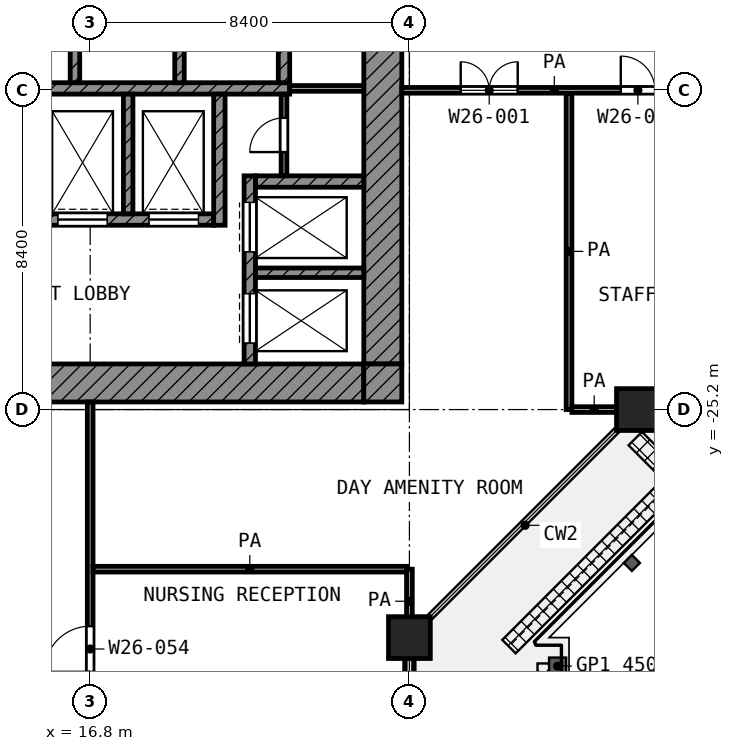
"""IFC4 building model, lengths in metres.
Left out: names, types, materials, properties, quantities, classifications, styles, units other than length and angle.
Written with IfcOpenShell. Run it as: python <this file> out.ifc"""

import sys

from ifc_helpers import new_model, si_unit, direction, frame, frame_2d, origin, origin_2d, place, context, subcontext, project, spatial, rectangle, extrude, element, fill, save


model = new_model("IFC4")
c1 = context("Model", 3, precision=1e-05, world=origin(), true_north=direction((0.0, 1.0)))
c2 = subcontext(c1, "Body", "Model", "MODEL_VIEW")
j1 = project(units=[si_unit("LENGTHUNIT", "METRE"), si_unit("PLANEANGLEUNIT", "RADIAN")], contexts=[c1])
p1 = place(None, origin())
s1 = spatial("IfcSite", under=j1, at=p1, CompositionType="ELEMENT")
p2 = place(p1, origin())
s2 = spatial("IfcBuilding", under=s1, at=p2, CompositionType="ELEMENT")
p3 = place(p2, frame((0.0, 0.0, 136.6)))
s3 = spatial("IfcBuildingStorey", under=s2, at=p3, CompositionType="ELEMENT", Elevation=136.6)
for number, where, z_axis, x_axis in (
    (1, (31.2, -25.2, 0.0), (0.0, 0.0, 1.0), (1.0, 0.0, 0.0)),
    (2, (25.2, -31.2, 0.0), (0.0, 0.0, 1.0), (1.0, 0.0, 0.0)),
):
    element("IfcColumn", number, at=place(p3, frame(where, z_axis=z_axis, x_axis=x_axis)), inside=s3, PredefinedType="COLUMN", context=c2, shape_type="SweptSolid", body=[
        extrude(rectangle(XDim=1.1, YDim=1.1, at=origin_2d()), origin(), (0.0, 0.0, 1.0), 4.2),
    ])
p4 = place(p3, frame((25.2, -34.992, 0.0), z_axis=(0.0, 0.0, 1.0), x_axis=(0.0, 1.0, 0.0)))
e3 = element("IfcWall", 3, at=p4, inside=s3, PredefinedType="SOLIDWALL", context=c2, shape_type="SweptSolid", body=[
    extrude(rectangle(XDim=3.242, YDim=0.25, at=frame_2d((1.621, 0.0))), origin(), (0.0, 0.0, 1.0), 3.48),
])
p5 = place(p4, frame((1.621, 0.0, 0.0)))
e4 = element("IfcOpeningElement", 4, at=p5, cuts=e3, PredefinedType="OPENING", context=c2, shape_type="SweptSolid", body=[
    extrude(rectangle(XDim=1.0, YDim=2.1, at=frame_2d((0.5, 1.05))), frame((0.0, 0.135, 0.0), z_axis=(0.0, -1.0, 0.0), x_axis=(1.0, 0.0, 0.0)), (0.0, 0.0, 1.0), 0.27),
])
p6 = place(p3, frame((24.5, -24.0, 0.0), z_axis=(0.0, 0.0, 1.0), x_axis=(0.0, 1.0, 0.0)))
e5 = element("IfcWall", 5, at=p6, inside=s3, PredefinedType="SHEAR", context=c2, shape_type="SweptSolid", body=[
    extrude(rectangle(XDim=18.6, YDim=1.0, at=frame_2d((9.3, 0.0))), origin(), (0.0, 0.0, 1.0), 3.6),
])
p7 = place(p6, frame((10.5, 0.0, 0.0)))
e6 = element("IfcOpeningElement", 6, at=p7, cuts=e5, PredefinedType="OPENING", context=c2, shape_type="SweptSolid", body=[
    extrude(rectangle(XDim=1.8, YDim=2.1, at=frame_2d((0.9, 1.05))), frame((0.0, 0.51, 0.0), z_axis=(0.0, -1.0, 0.0), x_axis=(1.0, 0.0, 0.0)), (0.0, 0.0, 1.0), 1.02),
])
p8 = place(p3, frame((5.4, -24.5, 0.0), z_axis=(0.0, 0.0, 1.0), x_axis=(1.0, 0.0, 0.0)))
e7 = element("IfcWall", 7, at=p8, inside=s3, PredefinedType="SHEAR", context=c2, shape_type="SweptSolid", body=[
    extrude(rectangle(XDim=18.6, YDim=1.0, at=frame_2d((9.3, 0.0))), origin(), (0.0, 0.0, 1.0), 3.6),
])
p9 = place(p8, frame((6.3, 0.0, 0.0)))
e8 = element("IfcOpeningElement", 8, at=p9, cuts=e7, PredefinedType="OPENING", context=c2, shape_type="SweptSolid", body=[
    extrude(rectangle(XDim=1.8, YDim=2.1, at=frame_2d((0.9, 1.05))), frame((0.0, 0.51, 0.0), z_axis=(0.0, -1.0, 0.0), x_axis=(1.0, 0.0, 0.0)), (0.0, 0.0, 1.0), 1.02),
])
p10 = place(p3, frame((24.5, -25.0, 0.0), z_axis=(0.0, 0.0, 1.0), x_axis=(0.0, 1.0, 0.0)))
e9 = element("IfcWall", 9, at=p10, inside=s3, PredefinedType="SHEAR", context=c2, shape_type="SweptSolid", body=[
    extrude(rectangle(XDim=1.0, YDim=1.0, at=frame_2d((0.5, 0.0))), origin(), (0.0, 0.0, 1.0), 3.6),
])
p11 = place(p3, frame((5.4, -16.75, 0.0), z_axis=(0.0, 0.0, 1.0), x_axis=(1.0, 0.0, 0.0)))
e10 = element("IfcWall", 10, at=p11, inside=s3, PredefinedType="SHEAR", context=c2, shape_type="SweptSolid", body=[
    extrude(rectangle(XDim=16.65, YDim=0.3, at=frame_2d((8.325, 0.0))), origin(), (0.0, 0.0, 1.0), 3.6),
])
p12 = place(p3, frame((5.4, -20.2, 0.0), z_axis=(0.0, 0.0, 1.0), x_axis=(1.0, 0.0, 0.0)))
e11 = element("IfcWall", 11, at=p12, inside=s3, PredefinedType="SHEAR", context=c2, shape_type="SweptSolid", body=[
    extrude(rectangle(XDim=14.65, YDim=0.3, at=frame_2d((7.325, 0.0))), origin(), (0.0, 0.0, 1.0), 3.6),
])
p13 = place(p12, frame((10.55, 0.0, 0.0)))
e12 = element("IfcOpeningElement", 12, at=p13, cuts=e11, PredefinedType="OPENING", context=c2, shape_type="SweptSolid", body=[
    extrude(rectangle(XDim=1.3, YDim=2.1, at=frame_2d((0.65, 1.05))), frame((0.0, 0.16, 0.0), z_axis=(0.0, -1.0, 0.0), x_axis=(1.0, 0.0, 0.0)), (0.0, 0.0, 1.0), 0.32),
])
p14 = place(p12, frame((12.95, 0.0, 0.0)))
e13 = element("IfcOpeningElement", 13, at=p14, cuts=e11, PredefinedType="OPENING", context=c2, shape_type="SweptSolid", body=[
    extrude(rectangle(XDim=1.3, YDim=2.1, at=frame_2d((0.65, 1.05))), frame((0.0, 0.16, 0.0), z_axis=(0.0, -1.0, 0.0), x_axis=(1.0, 0.0, 0.0)), (0.0, 0.0, 1.0), 0.32),
])
p15 = place(p12, frame((0.55, 0.0, 0.0)))
e14 = element("IfcOpeningElement", 14, at=p15, cuts=e11, PredefinedType="OPENING", context=c2, shape_type="SweptSolid", body=[
    extrude(rectangle(XDim=1.3, YDim=2.1, at=frame_2d((0.65, 1.05))), frame((0.0, 0.16, 0.0), z_axis=(0.0, -1.0, 0.0), x_axis=(1.0, 0.0, 0.0)), (0.0, 0.0, 1.0), 0.32),
])
p16 = place(p12, frame((2.95, 0.0, 0.0)))
e15 = element("IfcOpeningElement", 15, at=p16, cuts=e11, PredefinedType="OPENING", context=c2, shape_type="SweptSolid", body=[
    extrude(rectangle(XDim=1.3, YDim=2.1, at=frame_2d((0.65, 1.05))), frame((0.0, 0.16, 0.0), z_axis=(0.0, -1.0, 0.0), x_axis=(1.0, 0.0, 0.0)), (0.0, 0.0, 1.0), 0.32),
])
p17 = place(p12, frame((6.55, 0.0, 0.0)))
e16 = element("IfcOpeningElement", 16, at=p17, cuts=e11, PredefinedType="OPENING", context=c2, shape_type="SweptSolid", body=[
    extrude(rectangle(XDim=0.9, YDim=2.1, at=frame_2d((0.45, 1.05))), frame((0.0, 0.16, 0.0), z_axis=(0.0, -1.0, 0.0), x_axis=(1.0, 0.0, 0.0)), (0.0, 0.0, 1.0), 0.32),
])
p18 = place(p12, frame((8.95, 0.0, 0.0)))
e17 = element("IfcOpeningElement", 17, at=p18, cuts=e11, PredefinedType="OPENING", context=c2, shape_type="SweptSolid", body=[
    extrude(rectangle(XDim=0.9, YDim=2.1, at=frame_2d((0.45, 1.05))), frame((0.0, 0.16, 0.0), z_axis=(0.0, -1.0, 0.0), x_axis=(1.0, 0.0, 0.0)), (0.0, 0.0, 1.0), 0.32),
])
p19 = place(p3, frame((20.2, -20.35, 0.0), z_axis=(0.0, 0.0, 1.0), x_axis=(0.0, 1.0, 0.0)))
e18 = element("IfcWall", 18, at=p19, inside=s3, PredefinedType="SHEAR", context=c2, shape_type="SweptSolid", body=[
    extrude(rectangle(XDim=3.45, YDim=0.3, at=frame_2d((1.725, 0.0))), origin(), (0.0, 0.0, 1.0), 3.6),
])
p20 = place(p3, frame((21.9, -16.6, 0.0), z_axis=(0.0, 0.0, 1.0), x_axis=(0.0, 1.0, 0.0)))
e19 = element("IfcWall", 19, at=p20, inside=s3, PredefinedType="SHEAR", context=c2, shape_type="SweptSolid", body=[
    extrude(rectangle(XDim=2.35, YDim=0.3, at=frame_2d((1.175, 0.0))), origin(), (0.0, 0.0, 1.0), 3.6),
])
p21 = place(p3, frame((21.15, -19.2, 0.0), z_axis=(0.0, 0.0, 1.0), x_axis=(1.0, 0.0, 0.0)))
e20 = element("IfcWall", 20, at=p21, inside=s3, PredefinedType="SHEAR", context=c2, shape_type="SweptSolid", body=[
    extrude(rectangle(XDim=2.85, YDim=0.3, at=frame_2d((1.425, 0.0))), origin(), (0.0, 0.0, 1.0), 3.6),
])
p22 = place(p3, frame((21.0, -24.0, 0.0), z_axis=(0.0, 0.0, 1.0), x_axis=(0.0, 1.0, 0.0)))
e21 = element("IfcWall", 21, at=p22, inside=s3, PredefinedType="SHEAR", context=c2, shape_type="SweptSolid", body=[
    extrude(rectangle(XDim=4.95, YDim=0.3, at=frame_2d((2.475, 0.0))), origin(), (0.0, 0.0, 1.0), 3.6),
])
p23 = place(p22, frame((2.95, 0.0, 0.0)))
e22 = element("IfcOpeningElement", 22, at=p23, cuts=e21, PredefinedType="OPENING", context=c2, shape_type="SweptSolid", body=[
    extrude(rectangle(XDim=1.3, YDim=2.1, at=frame_2d((0.65, 1.05))), frame((0.0, 0.16, 0.0), z_axis=(0.0, -1.0, 0.0), x_axis=(1.0, 0.0, 0.0)), (0.0, 0.0, 1.0), 0.32),
])
p24 = place(p22, frame((0.55, 0.0, 0.0)))
e23 = element("IfcOpeningElement", 23, at=p24, cuts=e21, PredefinedType="OPENING", context=c2, shape_type="SweptSolid", body=[
    extrude(rectangle(XDim=1.3, YDim=2.1, at=frame_2d((0.65, 1.05))), frame((0.0, 0.16, 0.0), z_axis=(0.0, -1.0, 0.0), x_axis=(1.0, 0.0, 0.0)), (0.0, 0.0, 1.0), 0.32),
])
p25 = place(p3, frame((21.15, -21.6, 0.0), z_axis=(0.0, 0.0, 1.0), x_axis=(1.0, 0.0, 0.0)))
e24 = element("IfcWall", 24, at=p25, inside=s3, PredefinedType="SHEAR", context=c2, shape_type="SweptSolid", body=[
    extrude(rectangle(XDim=2.85, YDim=0.25, at=frame_2d((1.425, 0.0))), origin(), (0.0, 0.0, 1.0), 3.6),
])
p26 = place(p3, frame((17.8, -20.05, 0.0), z_axis=(0.0, 0.0, 1.0), x_axis=(0.0, 1.0, 0.0)))
e25 = element("IfcWall", 25, at=p26, inside=s3, PredefinedType="SHEAR", context=c2, shape_type="SweptSolid", body=[
    extrude(rectangle(XDim=3.15, YDim=0.25, at=frame_2d((1.575, 0.0))), origin(), (0.0, 0.0, 1.0), 3.6),
])
for number, where, z_axis, x_axis in (
    (26, (16.4, -16.6, 0.0), (0.0, 0.0, 1.0), (0.0, 1.0, 0.0)),
    (27, (19.15, -16.6, 0.0), (0.0, 0.0, 1.0), (0.0, 1.0, 0.0)),
):
    element("IfcWall", number, at=place(p3, frame(where, z_axis=z_axis, x_axis=x_axis)), inside=s3, PredefinedType="SHEAR", context=c2, shape_type="SweptSolid", body=[
        extrude(rectangle(XDim=2.35, YDim=0.25, at=frame_2d((1.175, 0.0))), origin(), (0.0, 0.0, 1.0), 3.6),
    ])
p27 = place(p3, frame((21.9, -19.05, 0.0), z_axis=(0.0, 0.0, 1.0), x_axis=(0.0, 1.0, 0.0)))
e28 = element("IfcWall", 28, at=p27, inside=s3, PredefinedType="PARTITIONING", context=c2, shape_type="SweptSolid", body=[
    extrude(rectangle(XDim=2.15, YDim=0.15, at=frame_2d((1.075, 0.0))), origin(), (0.0, 0.0, 1.0), 3.6),
])
p28 = place(p27, frame((0.625, 0.0, 0.0)))
e29 = element("IfcOpeningElement", 29, at=p28, cuts=e28, PredefinedType="OPENING", context=c2, shape_type="SweptSolid", body=[
    extrude(rectangle(XDim=0.9, YDim=2.1, at=frame_2d((0.45, 1.05))), frame((0.0, 0.085, 0.0), z_axis=(0.0, -1.0, 0.0), x_axis=(1.0, 0.0, 0.0)), (0.0, 0.0, 1.0), 0.17),
])
p29 = place(p3, frame((22.05, -16.75, 0.0), z_axis=(0.0, 0.0, 1.0), x_axis=(1.0, 0.0, 0.0)))
e30 = element("IfcWall", 30, at=p29, inside=s3, PredefinedType="PARTITIONING", context=c2, shape_type="SweptSolid", body=[
    extrude(rectangle(XDim=1.95, YDim=0.15, at=frame_2d((0.975, 0.0))), origin(), (0.0, 0.0, 1.0), 3.6),
])
p30 = place(p3, frame((16.875, -29.4, 0.0), z_axis=(0.0, 0.0, 1.0), x_axis=(1.0, 0.0, 0.0)))
e31 = element("IfcWall", 31, at=p30, inside=s3, PredefinedType="PARTITIONING", context=c2, shape_type="SweptSolid", body=[
    extrude(rectangle(XDim=8.25, YDim=0.15, at=frame_2d((4.125, 0.0))), origin(), (0.0, 0.0, 1.0), 3.6),
])
p31 = place(p3, frame((29.475, -25.2, 0.0), z_axis=(0.0, 0.0, 1.0), x_axis=(1.0, 0.0, 0.0)))
e32 = element("IfcWall", 32, at=p31, inside=s3, PredefinedType="PARTITIONING", context=c2, shape_type="SweptSolid", body=[
    extrude(rectangle(XDim=1.175, YDim=0.15, at=frame_2d((0.587, 0.0))), origin(), (0.0, 0.0, 1.0), 3.6),
])
p32 = place(p3, frame((25.0, -16.8, 0.0), z_axis=(0.0, 0.0, 1.0), x_axis=(1.0, 0.0, 0.0)))
e33 = element("IfcWall", 33, at=p32, inside=s3, PredefinedType="PARTITIONING", context=c2, shape_type="SweptSolid", body=[
    extrude(rectangle(XDim=8.025, YDim=0.15, at=frame_2d((4.012, 0.0))), origin(), (0.0, 0.0, 1.0), 3.6),
])
p33 = place(p32, frame((1.55, 0.0, 0.0)))
e34 = element("IfcOpeningElement", 34, at=p33, cuts=e33, PredefinedType="OPENING", context=c2, shape_type="SweptSolid", body=[
    extrude(rectangle(XDim=1.5, YDim=2.1, at=frame_2d((0.75, 1.05))), frame((0.0, 0.085, 0.0), z_axis=(0.0, -1.0, 0.0), x_axis=(1.0, 0.0, 0.0)), (0.0, 0.0, 1.0), 0.17),
])
p34 = place(p32, frame((5.762, 0.0, 0.0)))
e35 = element("IfcOpeningElement", 35, at=p34, cuts=e33, PredefinedType="OPENING", context=c2, shape_type="SweptSolid", body=[
    extrude(rectangle(XDim=0.9, YDim=2.1, at=frame_2d((0.45, 1.05))), frame((0.0, 0.085, 0.0), z_axis=(0.0, -1.0, 0.0), x_axis=(1.0, 0.0, 0.0)), (0.0, 0.0, 1.0), 0.17),
])
p35 = place(p3, frame((16.8, -58.72, 0.0), z_axis=(0.0, 0.0, 1.0), x_axis=(0.0, 1.0, 0.0)))
e36 = element("IfcWall", 36, at=p35, inside=s3, PredefinedType="PARTITIONING", context=c2, shape_type="SweptSolid", body=[
    extrude(rectangle(XDim=33.72, YDim=0.15, at=frame_2d((16.86, 0.0))), origin(), (0.0, 0.0, 1.0), 2.7),
])
p36 = place(p35, frame((26.62, 0.0, 0.0)))
e37 = element("IfcOpeningElement", 37, at=p36, cuts=e36, PredefinedType="OPENING", context=c2, shape_type="SweptSolid", body=[
    extrude(rectangle(XDim=1.2, YDim=2.1, at=frame_2d((0.6, 1.05))), frame((0.0, 0.085, 0.0), z_axis=(0.0, -1.0, 0.0), x_axis=(1.0, 0.0, 0.0)), (0.0, 0.0, 1.0), 0.17),
])
p37 = place(p35, frame((22.82, 0.0, 0.0)))
e38 = element("IfcOpeningElement", 38, at=p37, cuts=e36, PredefinedType="OPENING", context=c2, shape_type="SweptSolid", body=[
    extrude(rectangle(XDim=1.0, YDim=2.1, at=frame_2d((0.5, 1.05))), frame((0.0, 0.085, 0.0), z_axis=(0.0, -1.0, 0.0), x_axis=(1.0, 0.0, 0.0)), (0.0, 0.0, 1.0), 0.17),
])
p38 = place(p35, frame((17.92, 0.0, 0.0)))
e39 = element("IfcOpeningElement", 39, at=p38, cuts=e36, PredefinedType="OPENING", context=c2, shape_type="SweptSolid", body=[
    extrude(rectangle(XDim=1.2, YDim=2.1, at=frame_2d((0.6, 1.05))), frame((0.0, 0.085, 0.0), z_axis=(0.0, -1.0, 0.0), x_axis=(1.0, 0.0, 0.0)), (0.0, 0.0, 1.0), 0.17),
])
p39 = place(p35, frame((14.92, 0.0, 0.0)))
e40 = element("IfcOpeningElement", 40, at=p39, cuts=e36, PredefinedType="OPENING", context=c2, shape_type="SweptSolid", body=[
    extrude(rectangle(XDim=1.2, YDim=2.1, at=frame_2d((0.6, 1.05))), frame((0.0, 0.085, 0.0), z_axis=(0.0, -1.0, 0.0), x_axis=(1.0, 0.0, 0.0)), (0.0, 0.0, 1.0), 0.17),
])
p40 = place(p35, frame((9.02, 0.0, 0.0)))
e41 = element("IfcOpeningElement", 41, at=p40, cuts=e36, PredefinedType="OPENING", context=c2, shape_type="SweptSolid", body=[
    extrude(rectangle(XDim=1.2, YDim=2.1, at=frame_2d((0.6, 1.05))), frame((0.0, 0.085, 0.0), z_axis=(0.0, -1.0, 0.0), x_axis=(1.0, 0.0, 0.0)), (0.0, 0.0, 1.0), 0.17),
])
p41 = place(p35, frame((3.37, 0.0, 0.0)))
e42 = element("IfcOpeningElement", 42, at=p41, cuts=e36, PredefinedType="OPENING", context=c2, shape_type="SweptSolid", body=[
    extrude(rectangle(XDim=1.5, YDim=2.1, at=frame_2d((0.75, 1.05))), frame((0.0, 0.085, 0.0), z_axis=(0.0, -1.0, 0.0), x_axis=(1.0, 0.0, 0.0)), (0.0, 0.0, 1.0), 0.17),
])
p42 = place(p3, frame((25.2, -31.087, 0.0), z_axis=(0.0, 0.0, 1.0), x_axis=(0.0, 1.0, 0.0)))
e43 = element("IfcWall", 43, at=p42, inside=s3, PredefinedType="PARTITIONING", context=c2, shape_type="SweptSolid", body=[
    extrude(rectangle(XDim=1.687, YDim=0.15, at=frame_2d((0.844, 0.0))), origin(), (0.0, 0.0, 1.0), 3.6),
])
p43 = place(p3, frame((29.4, -25.2, 0.0), z_axis=(0.0, 0.0, 1.0), x_axis=(0.0, 1.0, 0.0)))
e44 = element("IfcWall", 44, at=p43, inside=s3, PredefinedType="PARTITIONING", context=c2, shape_type="SweptSolid", body=[
    extrude(rectangle(XDim=8.325, YDim=0.15, at=frame_2d((4.163, 0.0))), origin(), (0.0, 0.0, 1.0), 3.6),
])
p44 = place(p23, origin())
e45 = element("IfcDoor", 45, at=p44, inside=s3, OperationType="DOUBLE_DOOR_SLIDING", PredefinedType="DOOR", context=c2, shape_type="SweptSolid", body=[
    extrude(rectangle(XDim=1.3, YDim=2.1, at=frame_2d((0.65, 1.05))), frame((0.0, 0.025, 0.0), z_axis=(0.0, -1.0, 0.0), x_axis=(1.0, 0.0, 0.0)), (0.0, 0.0, 1.0), 0.05),
])
fill(e22, e45)
p45 = place(p24, origin())
e46 = element("IfcDoor", 46, at=p45, inside=s3, OperationType="DOUBLE_DOOR_SLIDING", PredefinedType="DOOR", context=c2, shape_type="SweptSolid", body=[
    extrude(rectangle(XDim=1.3, YDim=2.1, at=frame_2d((0.65, 1.05))), frame((0.0, 0.025, 0.0), z_axis=(0.0, -1.0, 0.0), x_axis=(1.0, 0.0, 0.0)), (0.0, 0.0, 1.0), 0.05),
])
fill(e23, e46)
p46 = place(p13, origin())
e47 = element("IfcDoor", 47, at=p46, inside=s3, OperationType="DOUBLE_DOOR_SLIDING", PredefinedType="DOOR", context=c2, shape_type="SweptSolid", body=[
    extrude(rectangle(XDim=1.3, YDim=2.1, at=frame_2d((0.65, 1.05))), frame((0.0, 0.025, 0.0), z_axis=(0.0, -1.0, 0.0), x_axis=(1.0, 0.0, 0.0)), (0.0, 0.0, 1.0), 0.05),
])
fill(e12, e47)
p47 = place(p14, origin())
e48 = element("IfcDoor", 48, at=p47, inside=s3, OperationType="DOUBLE_DOOR_SLIDING", PredefinedType="DOOR", context=c2, shape_type="SweptSolid", body=[
    extrude(rectangle(XDim=1.3, YDim=2.1, at=frame_2d((0.65, 1.05))), frame((0.0, 0.025, 0.0), z_axis=(0.0, -1.0, 0.0), x_axis=(1.0, 0.0, 0.0)), (0.0, 0.0, 1.0), 0.05),
])
fill(e13, e48)
p48 = place(p28, origin())
e49 = element("IfcDoor", 49, at=p48, inside=s3, OperationType="SINGLE_SWING_LEFT", PredefinedType="DOOR", context=c2, shape_type="SweptSolid", body=[
    extrude(rectangle(XDim=0.9, YDim=2.1, at=frame_2d((0.45, 1.05))), frame((0.0, 0.025, 0.0), z_axis=(0.0, -1.0, 0.0), x_axis=(1.0, 0.0, 0.0)), (0.0, 0.0, 1.0), 0.05),
])
fill(e29, e49)
p49 = place(p33, origin())
e50 = element("IfcDoor", 50, at=p49, inside=s3, OperationType="DOUBLE_DOOR_SINGLE_SWING", PredefinedType="DOOR", context=c2, shape_type="SweptSolid", body=[
    extrude(rectangle(XDim=1.5, YDim=2.1, at=frame_2d((0.75, 1.05))), frame((0.0, 0.025, 0.0), z_axis=(0.0, -1.0, 0.0), x_axis=(1.0, 0.0, 0.0)), (0.0, 0.0, 1.0), 0.05),
])
fill(e34, e50)
p50 = place(p34, origin())
e51 = element("IfcDoor", 51, at=p50, inside=s3, OperationType="SINGLE_SWING_LEFT", PredefinedType="DOOR", context=c2, shape_type="SweptSolid", body=[
    extrude(rectangle(XDim=0.9, YDim=2.1, at=frame_2d((0.45, 1.05))), frame((0.0, 0.025, 0.0), z_axis=(0.0, -1.0, 0.0), x_axis=(1.0, 0.0, 0.0)), (0.0, 0.0, 1.0), 0.05),
])
fill(e35, e51)
p51 = place(p36, origin())
e52 = element("IfcDoor", 52, at=p51, inside=s3, OperationType="SINGLE_SWING_LEFT", PredefinedType="DOOR", context=c2, shape_type="SweptSolid", body=[
    extrude(rectangle(XDim=1.2, YDim=2.1, at=frame_2d((0.6, 1.05))), frame((0.0, 0.025, 0.0), z_axis=(0.0, -1.0, 0.0), x_axis=(1.0, 0.0, 0.0)), (0.0, 0.0, 1.0), 0.05),
])
fill(e37, e52)
save(model, sys.argv[1])
